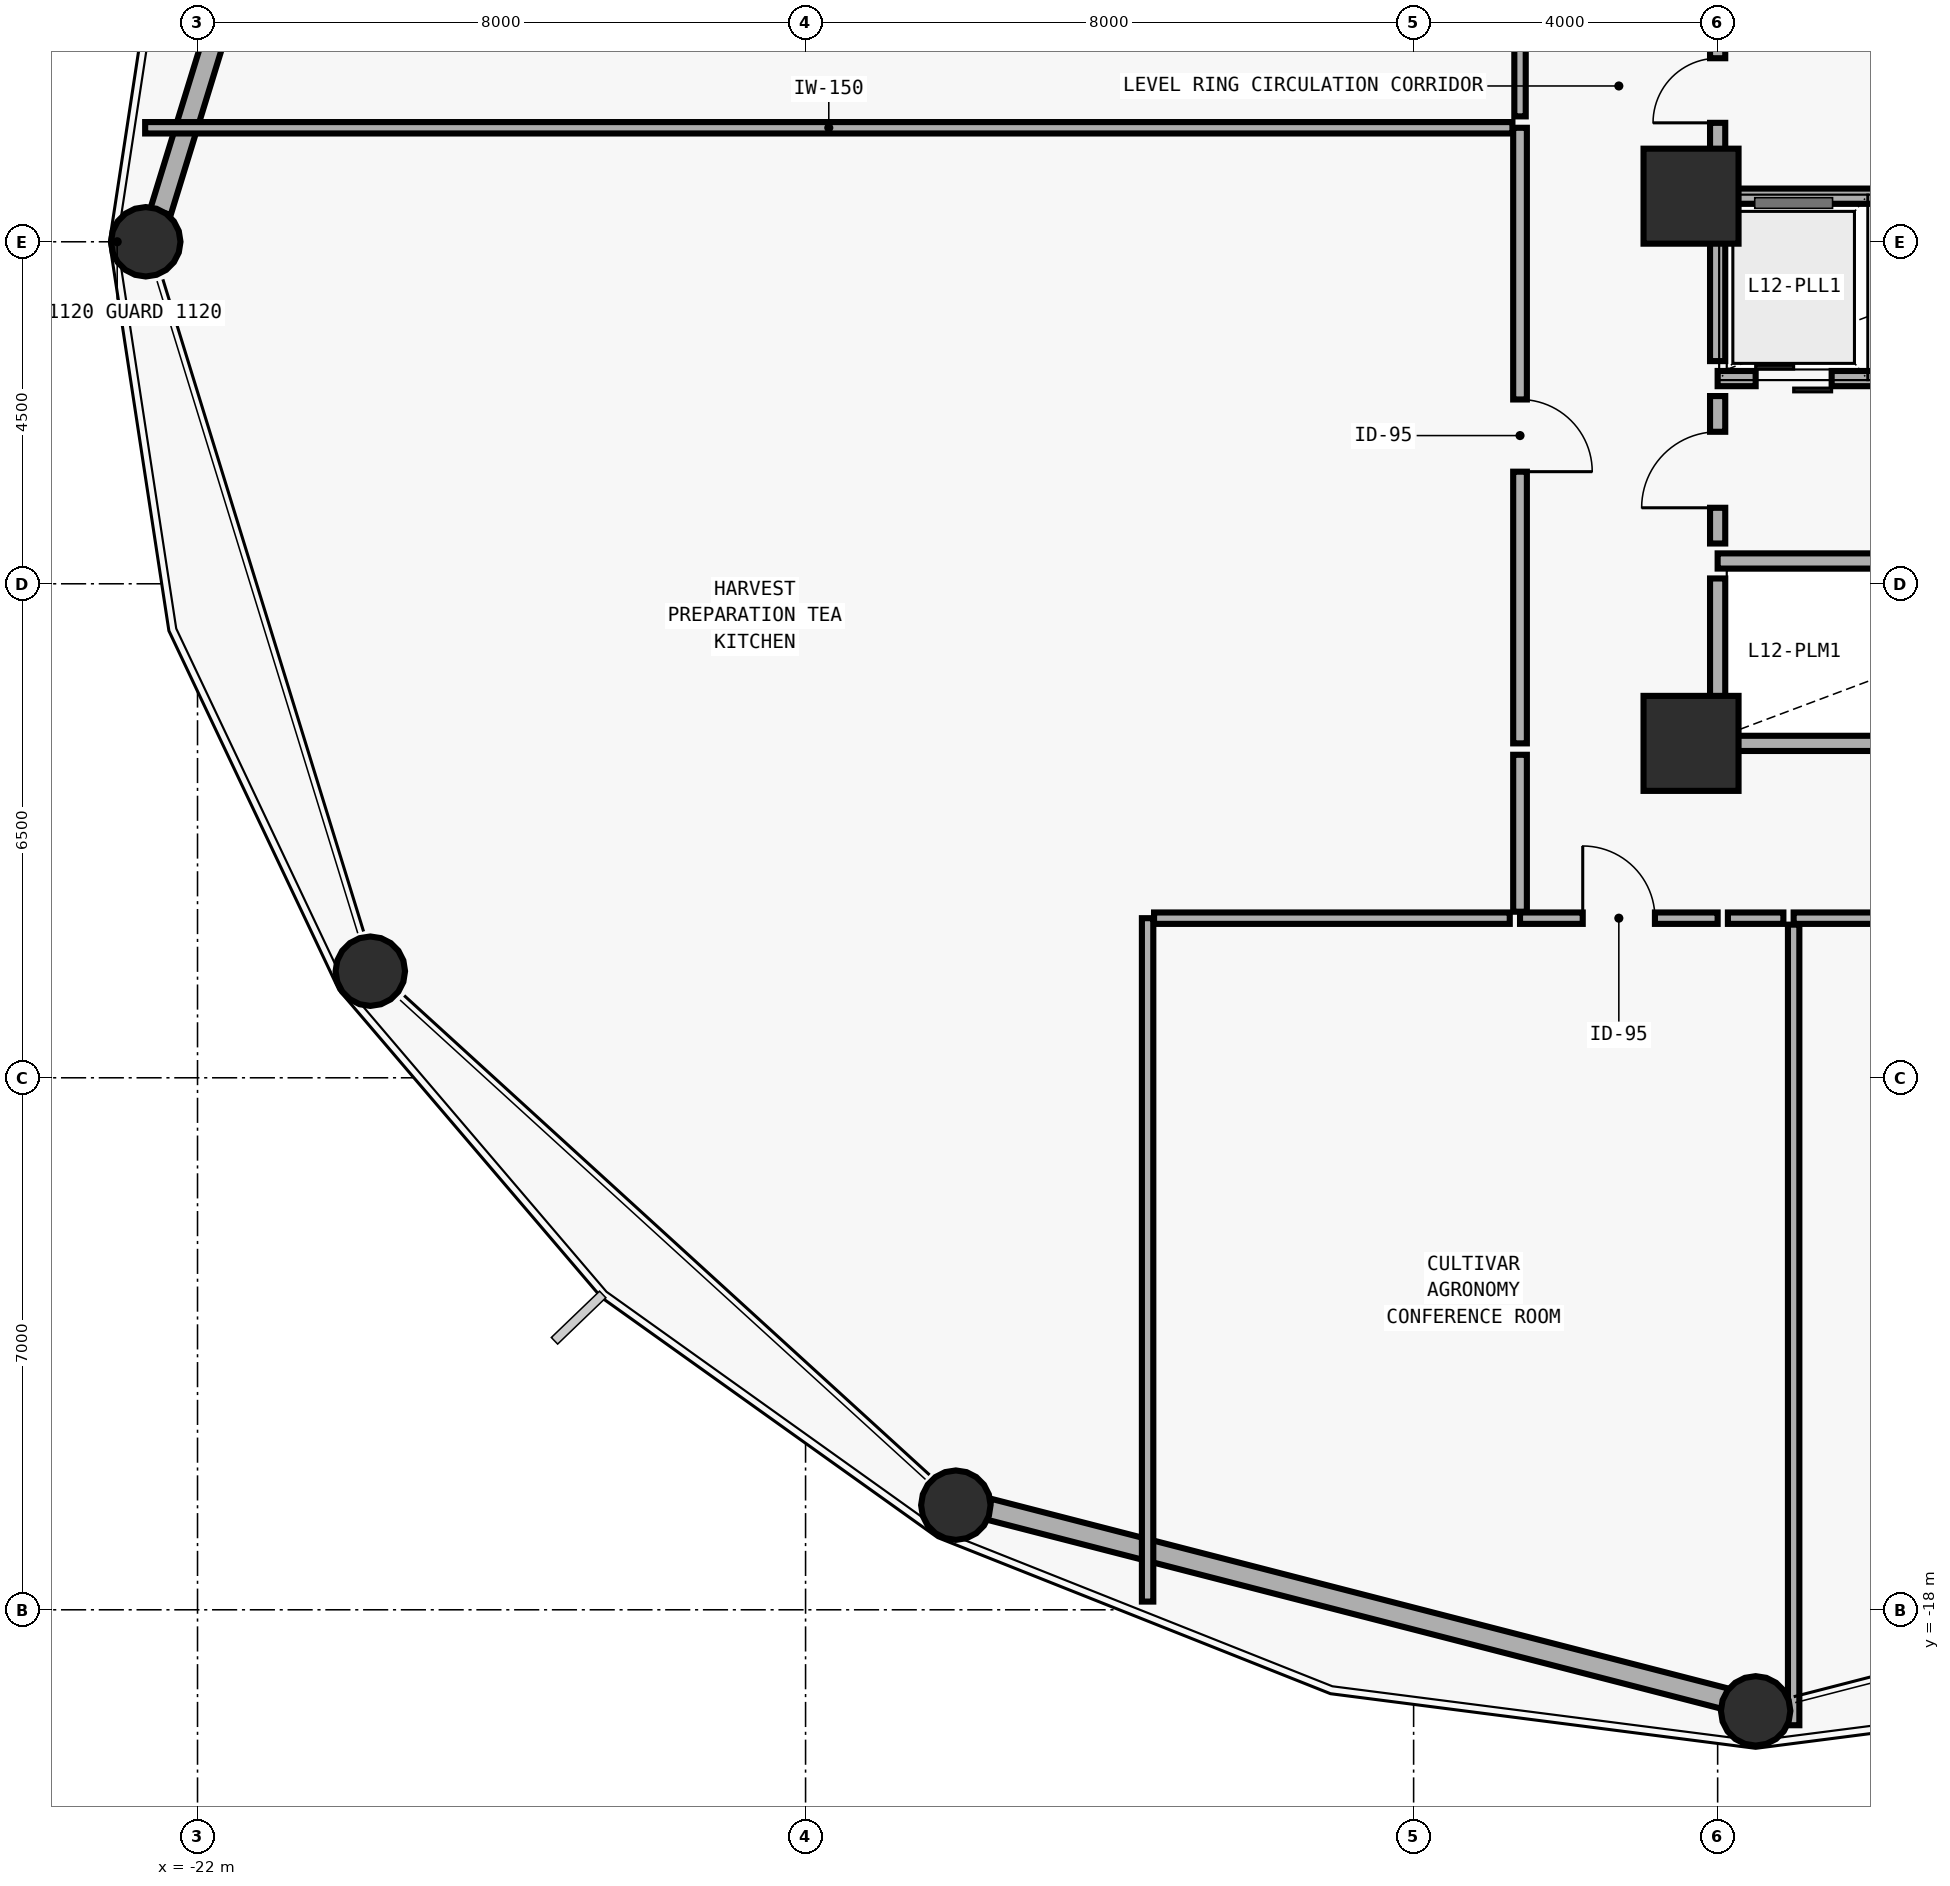
"""IFC4 building model, lengths in metres.
Left out: names, types, materials, properties, quantities, classifications, styles, units other than length and angle.
Written with IfcOpenShell. Run it as: python <this file> out.ifc"""

import sys

from ifc_helpers import new_model, si_unit, direction, frame, frame_2d, origin, origin_2d, place, context, subcontext, project, spatial, rectangle, hollow_circle, extrude, element, fill, save


model = new_model("IFC4")
c1 = context("Model", 3, precision=1e-05, world=origin(), true_north=direction((0.0, 1.0)))
c2 = subcontext(c1, "Body", "Model", "MODEL_VIEW")
j1 = project(units=[si_unit("LENGTHUNIT", "METRE"), si_unit("PLANEANGLEUNIT", "RADIAN")], contexts=[c1])
p1 = place(None, origin())
s1 = spatial("IfcSite", under=j1, at=p1, CompositionType="ELEMENT")
p2 = place(p1, origin())
s2 = spatial("IfcBuilding", under=s1, at=p2, CompositionType="ELEMENT")
p3 = place(p2, frame((0.0, 0.0, 51.0)))
s3 = spatial("IfcBuildingStorey", under=s2, at=p3, CompositionType="ELEMENT", Elevation=51.0)
for number, where, z_axis, x_axis in (
    (1, (-2.35, 0.6, 0.0), (0.0, 0.0, 1.0), (1.0, 0.0, 0.0)),
    (2, (-2.35, -6.6, 0.0), (0.0, 0.0, 1.0), (1.0, 0.0, 0.0)),
):
    element("IfcColumn", number, at=place(p3, frame(where, z_axis=z_axis, x_axis=x_axis)), inside=s3, PredefinedType="COLUMN", context=c2, shape_type="SweptSolid", body=[
        extrude(rectangle(XDim=1.25, YDim=1.25, at=origin_2d()), origin(), (0.0, 0.0, 1.0), 3.875),
    ])
p4 = place(p3, frame((-22.608, 0.0, 0.0), z_axis=(-0.037649698668, 0.0, 0.999290998754), x_axis=(0.0, -1.0, 0.0)))
e3 = element("IfcColumn", 3, at=p4, inside=s3, PredefinedType="COLUMN", context=c2, shape_type="SweptSolid", body=[
    extrude(hollow_circle(Radius=0.457, WallThickness=0.032, at=origin_2d()), origin(), (0.0, 0.0, 1.0), 3.878),
])
p5 = place(p3, frame((-19.663, -9.569, 0.0), z_axis=(-0.032615211628, -0.01467054886, 0.99936030688), x_axis=(0.410218260947, -0.911987378414, 0.0)))
e4 = element("IfcColumn", 4, at=p5, inside=s3, PredefinedType="COLUMN", context=c2, shape_type="SweptSolid", body=[
    extrude(hollow_circle(Radius=0.457, WallThickness=0.032, at=origin_2d()), origin(), (0.0, 0.0, 1.0), 3.877),
])
p6 = place(p3, frame((-11.987, -16.574, 0.0), z_axis=(-0.018828767594, -0.025440876615, 0.999498994151), x_axis=(0.803803843436, -0.594894428682, 0.0)))
e5 = element("IfcColumn", 5, at=p6, inside=s3, PredefinedType="COLUMN", context=c2, shape_type="SweptSolid", body=[
    extrude(hollow_circle(Radius=0.457, WallThickness=0.032, at=origin_2d()), origin(), (0.0, 0.0, 1.0), 3.877),
])
p7 = place(p3, frame((-1.5, -19.273, 0.0), z_axis=(0.0, -0.029410155544, 0.999567427816), x_axis=(1.0, 0.0, 0.0)))
e6 = element("IfcColumn", 6, at=p7, inside=s3, PredefinedType="COLUMN", context=c2, shape_type="SweptSolid", body=[
    extrude(hollow_circle(Radius=0.457, WallThickness=0.032, at=origin_2d()), origin(), (0.0, 0.0, 1.0), 3.877),
])
p8 = place(p3, frame((-22.487, 0.394, 0.0), z_axis=(0.0, 0.0, 1.0), x_axis=(0.29412506019, 0.95576694281, 0.0)))
e7 = element("IfcWall", 7, at=p8, inside=s3, PredefinedType="SOLIDWALL", context=c2, shape_type="SweptSolid", body=[
    extrude(rectangle(XDim=9.188, YDim=0.28, at=frame_2d((4.594, 0.0))), origin(), (0.0, 0.0, 1.0), 3.06),
])
p9 = place(p3, frame((-1.899, -19.17, 0.0), z_axis=(0.0, 0.0, 1.0), x_axis=(-0.968436738327, 0.249259470952, 0.0)))
e8 = element("IfcWall", 8, at=p9, inside=s3, PredefinedType="SOLIDWALL", context=c2, shape_type="SweptSolid", body=[
    extrude(rectangle(XDim=10.004, YDim=0.28, at=frame_2d((5.002, 0.0))), origin(), (0.0, 0.0, 1.0), 3.06),
])
p10 = place(p3, frame((-2.0, -1.8, 0.0), z_axis=(0.0, 0.0, 1.0), x_axis=(1.0, 0.0, 0.0)))
e9 = element("IfcWall", 9, at=p10, inside=s3, PredefinedType="SOLIDWALL", context=c2, shape_type="SweptSolid", body=[
    extrude(rectangle(XDim=6.0, YDim=0.2, at=frame_2d((3.0, 0.0))), origin(), (0.0, 0.0, 1.0), 3.64),
])
p11 = place(p10, frame((0.5, 0.0, 0.0)))
e10 = element("IfcOpeningElement", 10, at=p11, cuts=e9, PredefinedType="OPENING", context=c2, shape_type="SweptSolid", body=[
    extrude(rectangle(XDim=1.0, YDim=2.2, at=frame_2d((0.5, 1.1))), frame((0.0, 0.11, 0.0), z_axis=(0.0, -1.0, 0.0), x_axis=(1.0, 0.0, 0.0)), (0.0, 0.0, 1.0), 0.22),
])
p12 = place(p10, frame((2.45, 0.0, 0.0)))
e11 = element("IfcOpeningElement", 11, at=p12, cuts=e9, PredefinedType="OPENING", context=c2, shape_type="SweptSolid", body=[
    extrude(rectangle(XDim=1.0, YDim=2.2, at=frame_2d((0.5, 1.1))), frame((0.0, 0.11, 0.0), z_axis=(0.0, -1.0, 0.0), x_axis=(1.0, 0.0, 0.0)), (0.0, 0.0, 1.0), 0.22),
])
p13 = place(p10, frame((4.4, 0.0, 0.0)))
e12 = element("IfcOpeningElement", 12, at=p13, cuts=e9, PredefinedType="OPENING", context=c2, shape_type="SweptSolid", body=[
    extrude(rectangle(XDim=1.0, YDim=2.2, at=frame_2d((0.5, 1.1))), frame((0.0, 0.11, 0.0), z_axis=(0.0, -1.0, 0.0), x_axis=(1.0, 0.0, 0.0)), (0.0, 0.0, 1.0), 0.22),
])
p14 = place(p3, frame((-2.0, -1.57, 0.0), z_axis=(0.0, 0.0, 1.0), x_axis=(0.0, 1.0, 0.0)))
e13 = element("IfcWall", 13, at=p14, inside=s3, PredefinedType="SOLIDWALL", context=c2, shape_type="SweptSolid", body=[
    extrude(rectangle(XDim=2.05, YDim=0.2, at=frame_2d((1.025, 0.0))), origin(), (0.0, 0.0, 1.0), 3.022),
])
p15 = place(p3, frame((-2.0, -4.2, 0.0), z_axis=(0.0, 0.0, 1.0), x_axis=(1.0, 0.0, 0.0)))
e14 = element("IfcWall", 14, at=p15, inside=s3, PredefinedType="SOLIDWALL", context=c2, shape_type="SweptSolid", body=[
    extrude(rectangle(XDim=6.0, YDim=0.2, at=frame_2d((3.0, 0.0))), origin(), (0.0, 0.0, 1.0), 3.64),
])
p16 = place(p3, frame((-2.0, -6.6, 0.0), z_axis=(0.0, 0.0, 1.0), x_axis=(1.0, 0.0, 0.0)))
e15 = element("IfcWall", 15, at=p16, inside=s3, PredefinedType="SOLIDWALL", context=c2, shape_type="SweptSolid", body=[
    extrude(rectangle(XDim=6.0, YDim=0.2, at=frame_2d((3.0, 0.0))), origin(), (0.0, 0.0, 1.0), 3.122),
])
p17 = place(p3, frame((-2.0, -6.37, 0.0), z_axis=(0.0, 0.0, 1.0), x_axis=(0.0, 1.0, 0.0)))
e16 = element("IfcWall", 16, at=p17, inside=s3, PredefinedType="SOLIDWALL", context=c2, shape_type="SweptSolid", body=[
    extrude(rectangle(XDim=1.94, YDim=0.2, at=frame_2d((0.97, 0.0))), origin(), (0.0, 0.0, 1.0), 3.022),
])
p18 = place(p3, frame((-2.0, 0.72, 0.0), z_axis=(0.0, 0.0, 1.0), x_axis=(0.0, 1.0, 0.0)))
e17 = element("IfcWall", 17, at=p18, inside=s3, PredefinedType="MOVABLE", context=c2, shape_type="SweptSolid", body=[
    extrude(rectangle(XDim=2.25, YDim=0.2, at=frame_2d((1.125, 0.0))), origin(), (0.0, 0.0, 1.0), 2.872),
])
p19 = place(p18, frame((0.845, 0.0, 0.0)))
e18 = element("IfcOpeningElement", 18, at=p19, cuts=e17, PredefinedType="OPENING", context=c2, shape_type="SweptSolid", body=[
    extrude(rectangle(XDim=0.85, YDim=2.1, at=frame_2d((0.425, 1.05))), frame((0.0, 0.11, 0.0), z_axis=(0.0, -1.0, 0.0), x_axis=(1.0, 0.0, 0.0)), (0.0, 0.0, 1.0), 0.22),
])
p20 = place(p3, frame((-2.0, -3.97, 0.0), z_axis=(0.0, 0.0, 1.0), x_axis=(0.0, 1.0, 0.0)))
e19 = element("IfcWall", 19, at=p20, inside=s3, PredefinedType="MOVABLE", context=c2, shape_type="SweptSolid", body=[
    extrude(rectangle(XDim=1.94, YDim=0.2, at=frame_2d((0.97, 0.0))), origin(), (0.0, 0.0, 1.0), 3.022),
])
p21 = place(p20, frame((0.47, 0.0, 0.0)))
e20 = element("IfcOpeningElement", 20, at=p21, cuts=e19, PredefinedType="OPENING", context=c2, shape_type="SweptSolid", body=[
    extrude(rectangle(XDim=1.0, YDim=2.1, at=frame_2d((0.5, 1.05))), frame((0.0, 0.11, 0.0), z_axis=(0.0, -1.0, 0.0), x_axis=(1.0, 0.0, 0.0)), (0.0, 0.0, 1.0), 0.22),
])
p22 = place(p3, frame((-4.6, -8.9, 0.0), z_axis=(0.0, 0.0, 1.0), x_axis=(1.0, 0.0, 0.0)))
e21 = element("IfcWall", 21, at=p22, inside=s3, PredefinedType="PARTITIONING", context=c2, shape_type="SweptSolid", body=[
    extrude(rectangle(XDim=2.6, YDim=0.15, at=frame_2d((1.3, 0.0))), origin(), (0.0, 0.0, 1.0), 3.64),
])
p23 = place(p22, frame((0.825, 0.0, 0.0)))
e22 = element("IfcOpeningElement", 22, at=p23, cuts=e21, PredefinedType="OPENING", context=c2, shape_type="SweptSolid", body=[
    extrude(rectangle(XDim=0.95, YDim=2.1, at=frame_2d((0.475, 1.05))), frame((0.0, 0.085, 0.0), z_axis=(0.0, -1.0, 0.0), x_axis=(1.0, 0.0, 0.0)), (0.0, 0.0, 1.0), 0.17),
])
p24 = place(p3, frame((-1.0, -8.9, 0.0), z_axis=(0.0, 0.0, 1.0), x_axis=(1.0, 0.0, 0.0)))
e23 = element("IfcWall", 23, at=p24, inside=s3, PredefinedType="PARTITIONING", context=c2, shape_type="SweptSolid", body=[
    extrude(rectangle(XDim=8.5, YDim=0.15, at=frame_2d((4.25, 0.0))), origin(), (0.0, 0.0, 1.0), 3.64),
])
p25 = place(p24, frame((3.775, 0.0, 0.0)))
e24 = element("IfcOpeningElement", 24, at=p25, cuts=e23, PredefinedType="OPENING", context=c2, shape_type="SweptSolid", body=[
    extrude(rectangle(XDim=0.95, YDim=2.1, at=frame_2d((0.475, 1.05))), frame((0.0, 0.085, 0.0), z_axis=(0.0, -1.0, 0.0), x_axis=(1.0, 0.0, 0.0)), (0.0, 0.0, 1.0), 0.17),
])
p26 = place(p3, frame((-4.6, 1.5, 0.0), z_axis=(0.0, 0.0, 1.0), x_axis=(0.0, -1.0, 0.0)))
e25 = element("IfcWall", 25, at=p26, inside=s3, PredefinedType="PLUMBINGWALL", context=c2, shape_type="SweptSolid", body=[
    extrude(rectangle(XDim=8.1, YDim=0.18, at=frame_2d((4.05, 0.0))), origin(), (0.0, 0.0, 1.0), 3.64),
])
p27 = place(p26, frame((3.575, 0.0, 0.0)))
e26 = element("IfcOpeningElement", 26, at=p27, cuts=e25, PredefinedType="OPENING", context=c2, shape_type="SweptSolid", body=[
    extrude(rectangle(XDim=0.95, YDim=2.1, at=frame_2d((0.475, 1.05))), frame((0.0, 0.1, 0.0), z_axis=(0.0, -1.0, 0.0), x_axis=(1.0, 0.0, 0.0)), (0.0, 0.0, 1.0), 0.2),
])
p28 = place(p3, frame((-4.6, 12.5, 0.0), z_axis=(0.0, 0.0, 1.0), x_axis=(0.0, -1.0, 0.0)))
e27 = element("IfcWall", 27, at=p28, inside=s3, PredefinedType="PARTITIONING", context=c2, shape_type="SweptSolid", body=[
    extrude(rectangle(XDim=10.85, YDim=0.15, at=frame_2d((5.425, 0.0))), origin(), (0.0, 0.0, 1.0), 3.64),
])
p29 = place(p28, frame((5.025, 0.0, 0.0)))
e28 = element("IfcOpeningElement", 28, at=p29, cuts=e27, PredefinedType="OPENING", context=c2, shape_type="SweptSolid", body=[
    extrude(rectangle(XDim=0.95, YDim=2.1, at=frame_2d((0.475, 1.05))), frame((0.0, 0.085, 0.0), z_axis=(0.0, -1.0, 0.0), x_axis=(1.0, 0.0, 0.0)), (0.0, 0.0, 1.0), 0.17),
])
p30 = place(p3, frame((-1.88, 0.6, 0.0), z_axis=(0.0, 0.0, 1.0), x_axis=(1.0, 0.0, 0.0)))
e29 = element("IfcWall", 29, at=p30, inside=s3, PredefinedType="MOVABLE", context=c2, shape_type="SweptSolid", body=[
    extrude(rectangle(XDim=5.72, YDim=0.2, at=frame_2d((2.86, 0.0))), origin(), (0.0, 0.0, 1.0), 3.122),
])
p31 = place(p3, frame((-1.865, -8.9, 0.0), z_axis=(0.0, 0.0, 1.0), x_axis=(1.0, 0.0, 0.0)))
e30 = element("IfcWall", 30, at=p31, inside=s3, PredefinedType="PARTITIONING", context=c2, shape_type="SweptSolid", body=[
    extrude(rectangle(XDim=0.73, YDim=0.15, at=frame_2d((0.365, 0.0))), origin(), (0.0, 0.0, 1.0), 3.64),
])
p32 = place(p3, frame((-1.0, -8.985, 0.0), z_axis=(0.0, 0.0, 1.0), x_axis=(0.0, -1.0, 0.0)))
e31 = element("IfcWall", 31, at=p32, inside=s3, PredefinedType="PARTITIONING", context=c2, shape_type="SweptSolid", body=[
    extrude(rectangle(XDim=10.534, YDim=0.15, at=frame_2d((5.267, 0.0))), origin(), (0.0, 0.0, 1.0), 2.972),
])
p33 = place(p3, frame((-9.5, -17.892, 0.0), z_axis=(0.0, 0.0, 1.0), x_axis=(0.0, 1.0, 0.0)))
e32 = element("IfcWall", 32, at=p33, inside=s3, PredefinedType="PARTITIONING", context=c2, shape_type="SweptSolid", body=[
    extrude(rectangle(XDim=8.992, YDim=0.15, at=frame_2d((4.496, 0.0))), origin(), (0.0, 0.0, 1.0), 3.64),
])
p34 = place(p3, frame((-9.415, -8.9, 0.0), z_axis=(0.0, 0.0, 1.0), x_axis=(1.0, 0.0, 0.0)))
e33 = element("IfcWall", 33, at=p34, inside=s3, PredefinedType="PARTITIONING", context=c2, shape_type="SweptSolid", body=[
    extrude(rectangle(XDim=4.68, YDim=0.15, at=frame_2d((2.34, 0.0))), origin(), (0.0, 0.0, 1.0), 3.64),
])
p35 = place(p3, frame((-4.6, -6.75, 0.0), z_axis=(0.0, 0.0, 1.0), x_axis=(0.0, -1.0, 0.0)))
e34 = element("IfcWall", 34, at=p35, inside=s3, PredefinedType="PLUMBINGWALL", context=c2, shape_type="SweptSolid", body=[
    extrude(rectangle(XDim=2.065, YDim=0.18, at=frame_2d((1.032, 0.0))), origin(), (0.0, 0.0, 1.0), 3.64),
])
p36 = place(p3, frame((-22.689, 1.5, 0.0), z_axis=(0.0, 0.0, 1.0), x_axis=(1.0, 0.0, 0.0)))
e35 = element("IfcWall", 35, at=p36, inside=s3, PredefinedType="PARTITIONING", context=c2, shape_type="SweptSolid", body=[
    extrude(rectangle(XDim=17.989, YDim=0.15, at=frame_2d((8.995, 0.0))), origin(), (0.0, 0.0, 1.0), 3.64),
])
p37 = place(p19, origin())
e36 = element("IfcDoor", 36, at=p37, inside=s3, OperationType="SINGLE_SWING_LEFT", PredefinedType="DOOR", context=c2, shape_type="SweptSolid", body=[
    extrude(rectangle(XDim=0.85, YDim=2.1, at=frame_2d((0.425, 1.05))), frame((0.0, 0.025, 0.0), z_axis=(0.0, -1.0, 0.0), x_axis=(1.0, 0.0, 0.0)), (0.0, 0.0, 1.0), 0.05),
])
fill(e18, e36)
p38 = place(p21, origin())
e37 = element("IfcDoor", 37, at=p38, inside=s3, OperationType="SINGLE_SWING_LEFT", PredefinedType="DOOR", context=c2, shape_type="SweptSolid", body=[
    extrude(rectangle(XDim=1.0, YDim=2.1, at=frame_2d((0.5, 1.05))), frame((0.0, 0.025, 0.0), z_axis=(0.0, -1.0, 0.0), x_axis=(1.0, 0.0, 0.0)), (0.0, 0.0, 1.0), 0.05),
])
fill(e20, e37)
p39 = place(p23, origin())
e38 = element("IfcDoor", 38, at=p39, inside=s3, OperationType="SINGLE_SWING_LEFT", PredefinedType="DOOR", context=c2, shape_type="SweptSolid", body=[
    extrude(rectangle(XDim=0.95, YDim=2.1, at=frame_2d((0.475, 1.05))), frame((0.0, 0.025, 0.0), z_axis=(0.0, -1.0, 0.0), x_axis=(1.0, 0.0, 0.0)), (0.0, 0.0, 1.0), 0.05),
])
fill(e22, e38)
p40 = place(p27, origin())
e39 = element("IfcDoor", 39, at=p40, inside=s3, OperationType="SINGLE_SWING_RIGHT", PredefinedType="DOOR", context=c2, shape_type="SweptSolid", body=[
    extrude(rectangle(XDim=0.95, YDim=2.1, at=frame_2d((0.475, 1.05))), frame((0.0, 0.025, 0.0), z_axis=(0.0, -1.0, 0.0), x_axis=(1.0, 0.0, 0.0)), (0.0, 0.0, 1.0), 0.05),
])
fill(e26, e39)
p41 = place(p11, origin())
e40 = element("IfcDoor", 40, at=p41, inside=s3, OperationType="DOUBLE_DOOR_SLIDING", PredefinedType="DOOR", context=c2, shape_type="SweptSolid", body=[
    extrude(rectangle(XDim=1.0, YDim=2.2, at=frame_2d((0.5, 1.1))), frame((0.0, 0.025, 0.0), z_axis=(0.0, -1.0, 0.0), x_axis=(1.0, 0.0, 0.0)), (0.0, 0.0, 1.0), 0.05),
])
fill(e10, e40)
save(model, sys.argv[1])
